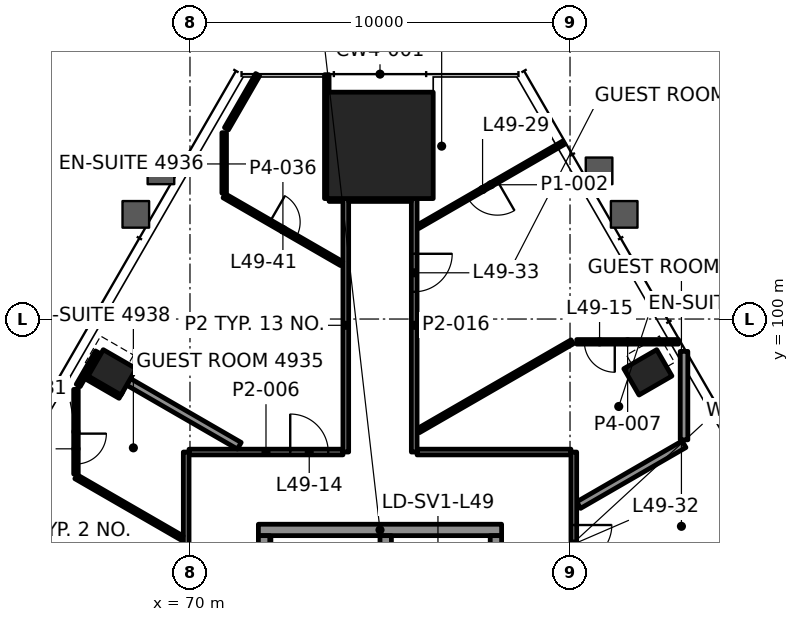
"""IFC4 building model, lengths in metres.
Left out: names, types, materials, properties, quantities, classifications, styles, units other than length and angle.
Written with IfcOpenShell. Run it as: python <this file> out.ifc"""

import sys

from ifc_helpers import new_model, si_unit, direction, frame, frame_2d, origin, origin_2d, place, context, subcontext, project, spatial, rectangle, hollow_rectangle, extrude, element, fill, save


model = new_model("IFC4")
c1 = context("Model", 3, precision=1e-05, world=origin(), true_north=direction((0.0, 1.0)))
c2 = subcontext(c1, "Body", "Model", "MODEL_VIEW")
j1 = project(units=[si_unit("LENGTHUNIT", "METRE"), si_unit("PLANEANGLEUNIT", "RADIAN")], contexts=[c1])
p1 = place(None, origin())
s1 = spatial("IfcSite", under=j1, at=p1, CompositionType="ELEMENT")
p2 = place(p1, origin())
s2 = spatial("IfcBuilding", under=s1, at=p2, CompositionType="ELEMENT")
p3 = place(p2, frame((0.0, 0.0, 210.4)))
s3 = spatial("IfcBuildingStorey", under=s2, at=p3, CompositionType="ELEMENT", Elevation=210.4)
p4 = place(p3, frame((75.0, 104.57, 0.0), z_axis=(0.0, 0.0, 1.0), x_axis=(-1.0, 0.0, 0.0)))
e1 = element("IfcColumn", 1, at=p4, inside=s3, PredefinedType="COLUMN", context=c2, shape_type="SweptSolid", body=[
    extrude(rectangle(XDim=2.8, YDim=2.8, at=origin_2d()), origin(), (0.0, 0.0, 1.0), 3.9),
])
for number, where, z_axis, x_axis in (
    (2, (82.048, 98.597, -0.0), (0.0, 0.0, 1.0), (-0.5, 0.866, 0.0)),
    (3, (67.952, 98.597, -0.0), (0.0, 0.0, 1.0), (-0.5, -0.866, 0.0)),
):
    element("IfcColumn", number, at=place(p3, frame(where, z_axis=z_axis, x_axis=x_axis)), inside=s3, PredefinedType="COLUMN", context=c2, shape_type="SweptSolid", body=[
        extrude(hollow_rectangle(XDim=0.8, YDim=1.0, WallThickness=0.05, at=origin_2d()), origin(), (0.0, 0.0, 1.0), 3.9),
    ])
p5 = place(p3, frame((71.8, 94.45, 0.0), z_axis=(0.0, 0.0, 1.0), x_axis=(1.0, 0.0, 0.0)))
e4 = element("IfcWall", 4, at=p5, inside=s3, PredefinedType="SHEAR", context=c2, shape_type="SweptSolid", body=[
    extrude(rectangle(XDim=6.4, YDim=0.3, at=frame_2d((3.2, 0.0))), origin(), (0.0, 0.0, 1.0), 3.7),
])
for number, where, z_axis, x_axis in (
    (5, (71.95, 88.1, 0.0), (0.0, 0.0, 1.0), (0.0, 1.0, 0.0)),
    (6, (78.05, 88.1, 0.0), (0.0, 0.0, 1.0), (0.0, 1.0, 0.0)),
):
    element("IfcWall", number, at=place(p3, frame(where, z_axis=z_axis, x_axis=x_axis)), inside=s3, PredefinedType="SHEAR", context=c2, shape_type="SweptSolid", body=[
        extrude(rectangle(XDim=6.2, YDim=0.3, at=frame_2d((3.1, 0.0))), origin(), (0.0, 0.0, 1.0), 3.7),
    ])
p6 = place(p3, frame((75.15, 88.1, 0.0), z_axis=(0.0, 0.0, 1.0), x_axis=(0.0, 1.0, 0.0)))
e7 = element("IfcWall", 7, at=p6, inside=s3, PredefinedType="SHEAR", context=c2, shape_type="SweptSolid", body=[
    extrude(rectangle(XDim=6.2, YDim=0.3, at=frame_2d((3.1, 0.0))), origin(), (0.0, 0.0, 1.0), 3.7),
])
p7 = place(p6, frame((0.185, 0.0, 0.0)))
e8 = element("IfcOpeningElement", 8, at=p7, cuts=e7, PredefinedType="OPENING", context=c2, shape_type="SweptSolid", body=[
    extrude(rectangle(XDim=1.0, YDim=2.1, at=frame_2d((0.5, 1.05))), frame((0.0, 0.16, 0.0), z_axis=(0.0, -1.0, 0.0), x_axis=(1.0, 0.0, 0.0)), (0.0, 0.0, 1.0), 0.32),
])
p8 = place(p3, frame((69.975, 96.5, 0.0), z_axis=(0.0, 0.0, 1.0), x_axis=(1.0, 0.0, 0.0)))
e9 = element("IfcWall", 9, at=p8, inside=s3, PredefinedType="PARTITIONING", context=c2, shape_type="SweptSolid", body=[
    extrude(rectangle(XDim=4.05, YDim=0.15, at=frame_2d((2.025, 0.0))), origin(), (0.0, 0.0, 1.0), 3.1),
])
p9 = place(p8, frame((2.663, 0.0, 0.0)))
e10 = element("IfcOpeningElement", 10, at=p9, cuts=e9, PredefinedType="OPENING", context=c2, shape_type="SweptSolid", body=[
    extrude(rectangle(XDim=1.0, YDim=2.1, at=frame_2d((0.5, 1.05))), frame((0.0, 0.085, 0.0), z_axis=(0.0, -1.0, 0.0), x_axis=(1.0, 0.0, 0.0)), (0.0, 0.0, 1.0), 0.17),
])
p10 = place(p3, frame((75.975, 96.5, 0.0), z_axis=(0.0, 0.0, 1.0), x_axis=(1.0, 0.0, 0.0)))
e11 = element("IfcWall", 11, at=p10, inside=s3, PredefinedType="PARTITIONING", context=c2, shape_type="SweptSolid", body=[
    extrude(rectangle(XDim=4.049, YDim=0.15, at=frame_2d((2.025, 0.0))), origin(), (0.0, 0.0, 1.0), 3.1),
])
p11 = place(p3, frame((82.855, 99.4, 0.0), z_axis=(0.0, 0.0, 1.0), x_axis=(-1.0, 0.0, 0.0)))
e12 = element("IfcWall", 12, at=p11, inside=s3, PredefinedType="PARTITIONING", context=c2, shape_type="SweptSolid", body=[
    extrude(rectangle(XDim=2.678, YDim=0.12, at=frame_2d((1.339, 0.0))), origin(), (0.0, 0.0, 1.0), 3.1),
])
p12 = place(p11, frame((1.677, 0.0, 0.0)))
e13 = element("IfcOpeningElement", 13, at=p12, cuts=e12, PredefinedType="OPENING", context=c2, shape_type="SweptSolid", body=[
    extrude(rectangle(XDim=0.8, YDim=2.1, at=frame_2d((0.4, 1.05))), frame((0.0, 0.07, 0.0), z_axis=(0.0, -1.0, 0.0), x_axis=(1.0, 0.0, 0.0)), (0.0, 0.0, 1.0), 0.14),
])
p13 = place(p3, frame((73.66, 103.17, 0.0), z_axis=(0.0, 0.0, 1.0), x_axis=(1.0, 0.0, 0.0)))
e14 = element("IfcWall", 14, at=p13, inside=s3, PredefinedType="PARTITIONING", context=c2, shape_type="SweptSolid", body=[
    extrude(rectangle(XDim=0.365, YDim=0.15, at=frame_2d((0.182, 0.0))), origin(), (0.0, 0.0, 1.0), 3.1),
])
p14 = place(p3, frame((80.227, 95.104, 0.0), z_axis=(0.0, 0.0, 1.0), x_axis=(0.866029421769, 0.499993040581, 0.0)))
e15 = element("IfcWall", 15, at=p14, inside=s3, PredefinedType="PARTITIONING", context=c2, shape_type="SweptSolid", body=[
    extrude(rectangle(XDim=3.202, YDim=0.2, at=frame_2d((1.601, 0.0))), origin(), (0.0, 0.0, 1.0), 3.022),
])
p15 = place(p3, frame((76.01, 97.063, 0.0), z_axis=(0.0, 0.0, 1.0), x_axis=(0.866045536992, 0.499965126639, 0.0)))
e16 = element("IfcWall", 16, at=p15, inside=s3, PredefinedType="PARTITIONING", context=c2, shape_type="SweptSolid", body=[
    extrude(rectangle(XDim=4.674, YDim=0.12, at=frame_2d((2.337, 0.0))), origin(), (0.0, 0.0, 1.0), 3.1),
])
p16 = place(p3, frame((79.83, 104.639, 0.0), z_axis=(0.0, 0.0, 1.0), x_axis=(-0.866005358171, -0.500034718414, 0.0)))
e17 = element("IfcWall", 17, at=p16, inside=s3, PredefinedType="PARTITIONING", context=c2, shape_type="SweptSolid", body=[
    extrude(rectangle(XDim=4.422, YDim=0.1, at=frame_2d((2.211, 0.0))), origin(), (0.0, 0.0, 1.0), 3.1),
])
p17 = place(p16, frame((2.011, 0.0, 0.0)))
e18 = element("IfcOpeningElement", 18, at=p17, cuts=e17, PredefinedType="OPENING", context=c2, shape_type="SweptSolid", body=[
    extrude(rectangle(XDim=0.9, YDim=2.1, at=frame_2d((0.45, 1.05))), frame((0.0, 0.06, 0.0), z_axis=(0.0, -1.0, 0.0), x_axis=(1.0, 0.0, 0.0)), (0.0, 0.0, 1.0), 0.12),
])
p18 = place(p3, frame((67.06, 98.253, 0.0), z_axis=(0.0, 0.0, 1.0), x_axis=(0.499972622635, 0.866041209536, 0.0)))
e19 = element("IfcWall", 19, at=p18, inside=s3, PredefinedType="PARTITIONING", context=c2, shape_type="SweptSolid", body=[
    extrude(rectangle(XDim=1.014, YDim=0.12, at=frame_2d((0.507, 0.0))), origin(), (0.0, 0.0, 1.0), 3.1),
])
p19 = place(p3, frame((70.96, 105.008, 0.0), z_axis=(0.0, 0.0, 1.0), x_axis=(0.500057100911, 0.865992434048, 0.0)))
e20 = element("IfcWall", 20, at=p19, inside=s3, PredefinedType="PARTITIONING", context=c2, shape_type="SweptSolid", body=[
    extrude(rectangle(XDim=1.642, YDim=0.12, at=frame_2d((0.821, 0.0))), origin(), (0.0, 0.0, 1.0), 3.1),
])
p20 = place(p3, frame((83.0, 96.821, 0.0), z_axis=(0.0, 0.0, 1.0), x_axis=(0.0, 1.0, 0.0)))
e21 = element("IfcWall", 21, at=p20, inside=s3, PredefinedType="PARTITIONING", context=c2, shape_type="SweptSolid", body=[
    extrude(rectangle(XDim=2.328, YDim=0.2, at=frame_2d((1.164, 0.0))), origin(), (0.0, 0.0, 1.0), 3.022),
])
p21 = place(p3, frame((80.1, 96.5, 0.0), z_axis=(0.0, 0.0, 1.0), x_axis=(0.0, -1.0, 0.0)))
e22 = element("IfcWall", 22, at=p21, inside=s3, PredefinedType="PARTITIONING", context=c2, shape_type="SweptSolid", body=[
    extrude(rectangle(XDim=10.6, YDim=0.15, at=frame_2d((5.3, 0.0))), origin(), (0.0, 0.0, 1.0), 3.097),
])
p22 = place(p21, frame((1.92, 0.0, 0.0)))
e23 = element("IfcOpeningElement", 23, at=p22, cuts=e22, PredefinedType="OPENING", context=c2, shape_type="SweptSolid", body=[
    extrude(rectangle(XDim=1.0, YDim=2.1, at=frame_2d((0.5, 1.05))), frame((0.0, 0.085, 0.0), z_axis=(0.0, -1.0, 0.0), x_axis=(1.0, 0.0, 0.0)), (0.0, 0.0, 1.0), 0.17),
])
p23 = place(p3, frame((75.9, 103.169, 0.0), z_axis=(0.0, 0.0, 1.0), x_axis=(0.0, -1.0, 0.0)))
e24 = element("IfcWall", 24, at=p23, inside=s3, PredefinedType="PARTITIONING", context=c2, shape_type="SweptSolid", body=[
    extrude(rectangle(XDim=6.669, YDim=0.15, at=frame_2d((3.334, 0.0))), origin(), (0.0, 0.0, 1.0), 3.1),
])
p24 = place(p23, frame((1.452, 0.0, 0.0)))
e25 = element("IfcOpeningElement", 25, at=p24, cuts=e24, PredefinedType="OPENING", context=c2, shape_type="SweptSolid", body=[
    extrude(rectangle(XDim=1.0, YDim=2.1, at=frame_2d((0.5, 1.05))), frame((0.0, 0.085, 0.0), z_axis=(0.0, -1.0, 0.0), x_axis=(1.0, 0.0, 0.0)), (0.0, 0.0, 1.0), 0.17),
])
p25 = place(p3, frame((74.1, 96.5, 0.0), z_axis=(0.0, 0.0, 1.0), x_axis=(0.0, 1.0, 0.0)))
e26 = element("IfcWall", 26, at=p25, inside=s3, PredefinedType="PARTITIONING", context=c2, shape_type="SweptSolid", body=[
    extrude(rectangle(XDim=6.67, YDim=0.15, at=frame_2d((3.335, 0.0))), origin(), (0.0, 0.0, 1.0), 3.1),
])
p26 = place(p3, frame((73.6, 103.17, 0.0), z_axis=(0.0, 0.0, 1.0), x_axis=(0.0, 1.0, 0.0)))
e27 = element("IfcWall", 27, at=p26, inside=s3, PredefinedType="PARTITIONING", context=c2, shape_type="SweptSolid", body=[
    extrude(rectangle(XDim=3.26, YDim=0.12, at=frame_2d((1.63, 0.0))), origin(), (0.0, 0.0, 1.0), 3.1),
])
p27 = place(p3, frame((70.9, 103.312, 0.0), z_axis=(0.0, 0.0, 1.0), x_axis=(0.0, 1.0, 0.0)))
e28 = element("IfcWall", 28, at=p27, inside=s3, PredefinedType="PARTITIONING", context=c2, shape_type="SweptSolid", body=[
    extrude(rectangle(XDim=1.592, YDim=0.12, at=frame_2d((0.796, 0.0))), origin(), (0.0, 0.0, 1.0), 3.1),
])
p28 = place(p3, frame((69.9, 85.9, 0.0), z_axis=(0.0, 0.0, 1.0), x_axis=(0.0, 1.0, 0.0)))
e29 = element("IfcWall", 29, at=p28, inside=s3, PredefinedType="PARTITIONING", context=c2, shape_type="SweptSolid", body=[
    extrude(rectangle(XDim=10.6, YDim=0.15, at=frame_2d((5.3, 0.0))), origin(), (0.0, 0.0, 1.0), 3.097),
])
p29 = place(p28, frame((1.968, 0.0, 0.0)))
e30 = element("IfcOpeningElement", 30, at=p29, cuts=e29, PredefinedType="OPENING", context=c2, shape_type="SweptSolid", body=[
    extrude(rectangle(XDim=0.9, YDim=2.1, at=frame_2d((0.45, 1.05))), frame((0.0, 0.085, 0.0), z_axis=(0.0, -1.0, 0.0), x_axis=(1.0, 0.0, 0.0)), (0.0, 0.0, 1.0), 0.17),
])
p30 = place(p28, frame((6.825, 0.0, 0.0)))
e31 = element("IfcOpeningElement", 31, at=p30, cuts=e29, PredefinedType="OPENING", context=c2, shape_type="SweptSolid", body=[
    extrude(rectangle(XDim=1.0, YDim=2.1, at=frame_2d((0.5, 1.05))), frame((0.0, 0.085, 0.0), z_axis=(0.0, -1.0, 0.0), x_axis=(1.0, 0.0, 0.0)), (0.0, 0.0, 1.0), 0.17),
])
p31 = place(p3, frame((67.0, 98.149, 0.0), z_axis=(0.0, 0.0, 1.0), x_axis=(0.0, -1.0, 0.0)))
e32 = element("IfcWall", 32, at=p31, inside=s3, PredefinedType="PARTITIONING", context=c2, shape_type="SweptSolid", body=[
    extrude(rectangle(XDim=2.228, YDim=0.12, at=frame_2d((1.114, 0.0))), origin(), (0.0, 0.0, 1.0), 3.022),
])
p32 = place(p31, frame((1.164, 0.0, 0.0)))
e33 = element("IfcOpeningElement", 33, at=p32, cuts=e32, PredefinedType="OPENING", context=c2, shape_type="SweptSolid", body=[
    extrude(rectangle(XDim=0.8, YDim=2.1, at=frame_2d((0.4, 1.05))), frame((0.0, 0.07, 0.0), z_axis=(0.0, -1.0, 0.0), x_axis=(1.0, 0.0, 0.0)), (0.0, 0.0, 1.0), 0.14),
])
p33 = place(p3, frame((70.9, 103.243, 0.0), z_axis=(0.0, 0.0, 1.0), x_axis=(0.866028357664, -0.499994883695, 0.0)))
e34 = element("IfcWall", 34, at=p33, inside=s3, PredefinedType="PARTITIONING", context=c2, shape_type="SweptSolid", body=[
    extrude(rectangle(XDim=3.568, YDim=0.12, at=frame_2d((1.784, 0.0))), origin(), (0.0, 0.0, 1.0), 3.1),
])
p34 = place(p33, frame((1.384, 0.0, 0.0)))
e35 = element("IfcOpeningElement", 35, at=p34, cuts=e34, PredefinedType="OPENING", context=c2, shape_type="SweptSolid", body=[
    extrude(rectangle(XDim=0.8, YDim=2.1, at=frame_2d((0.4, 1.05))), frame((0.0, 0.07, 0.0), z_axis=(0.0, -1.0, 0.0), x_axis=(1.0, 0.0, 0.0)), (0.0, 0.0, 1.0), 0.14),
])
p35 = place(p3, frame((71.298, 96.665, 0.0), z_axis=(0.0, 0.0, 1.0), x_axis=(-0.866023625329, 0.500003080363, 0.0)))
e36 = element("IfcWall", 36, at=p35, inside=s3, PredefinedType="PARTITIONING", context=c2, shape_type="SweptSolid", body=[
    extrude(rectangle(XDim=3.364, YDim=0.2, at=frame_2d((1.682, 0.0))), origin(), (0.0, 0.0, 1.0), 3.1),
])
p36 = place(p3, frame((68.185, 98.0, 0.0), z_axis=(0.0, 0.0, 1.0), x_axis=(-0.866071776036, 0.499919672301, 0.0)))
e37 = element("IfcWall", 37, at=p36, inside=s3, PredefinedType="PARTITIONING", context=c2, shape_type="SweptSolid", body=[
    extrude(rectangle(XDim=1.0, YDim=0.2, at=frame_2d((0.5, 0.0))), origin(), (0.0, 0.0, 1.0), 3.022),
])
p37 = place(p3, frame((69.79, 94.24, 0.0), z_axis=(0.0, 0.0, 1.0), x_axis=(-0.86604299788, 0.499969524894, 0.0)))
e38 = element("IfcWall", 38, at=p37, inside=s3, PredefinedType="PARTITIONING", context=c2, shape_type="SweptSolid", body=[
    extrude(rectangle(XDim=3.222, YDim=0.12, at=frame_2d((1.611, 0.0))), origin(), (0.0, 0.0, 1.0), 3.1),
])
p38 = place(p3, frame((74.175, 103.17, 0.0), z_axis=(0.0, 0.0, 1.0), x_axis=(1.0, 0.0, 0.0)))
e39 = element("IfcWall", 39, at=p38, inside=s3, PredefinedType="PARTITIONING", context=c2, shape_type="SweptSolid", body=[
    extrude(rectangle(XDim=1.649, YDim=0.15, at=frame_2d((0.825, 0.0))), origin(), (0.0, 0.0, 1.0), 3.097),
])
p39 = place(p9, origin())
e40 = element("IfcDoor", 40, at=p39, inside=s3, OperationType="SINGLE_SWING_RIGHT", PredefinedType="DOOR", context=c2, shape_type="SweptSolid", body=[
    extrude(rectangle(XDim=1.0, YDim=2.1, at=frame_2d((0.5, 1.05))), frame((0.0, 0.025, 0.0), z_axis=(0.0, -1.0, 0.0), x_axis=(1.0, 0.0, 0.0)), (0.0, 0.0, 1.0), 0.05),
])
fill(e10, e40)
p40 = place(p12, origin())
e41 = element("IfcDoor", 41, at=p40, inside=s3, OperationType="SINGLE_SWING_LEFT", PredefinedType="DOOR", context=c2, shape_type="SweptSolid", body=[
    extrude(rectangle(XDim=0.8, YDim=2.1, at=frame_2d((0.4, 1.05))), frame((0.0, 0.025, 0.0), z_axis=(0.0, -1.0, 0.0), x_axis=(1.0, 0.0, 0.0)), (0.0, 0.0, 1.0), 0.05),
])
fill(e13, e41)
p41 = place(p17, origin())
e42 = element("IfcDoor", 42, at=p41, inside=s3, OperationType="SINGLE_SWING_RIGHT", PredefinedType="DOOR", context=c2, shape_type="SweptSolid", body=[
    extrude(rectangle(XDim=0.9, YDim=2.1, at=frame_2d((0.45, 1.05))), frame((0.0, 0.025, 0.0), z_axis=(0.0, -1.0, 0.0), x_axis=(1.0, 0.0, 0.0)), (0.0, 0.0, 1.0), 0.05),
])
fill(e18, e42)
p42 = place(p22, origin())
e43 = element("IfcDoor", 43, at=p42, inside=s3, OperationType="SINGLE_SWING_RIGHT", PredefinedType="DOOR", context=c2, shape_type="SweptSolid", body=[
    extrude(rectangle(XDim=1.0, YDim=2.1, at=frame_2d((0.5, 1.05))), frame((0.0, 0.025, 0.0), z_axis=(0.0, -1.0, 0.0), x_axis=(1.0, 0.0, 0.0)), (0.0, 0.0, 1.0), 0.05),
])
fill(e23, e43)
p43 = place(p24, origin())
e44 = element("IfcDoor", 44, at=p43, inside=s3, OperationType="SINGLE_SWING_RIGHT", PredefinedType="DOOR", context=c2, shape_type="SweptSolid", body=[
    extrude(rectangle(XDim=1.0, YDim=2.1, at=frame_2d((0.5, 1.05))), frame((0.0, 0.025, 0.0), z_axis=(0.0, -1.0, 0.0), x_axis=(1.0, 0.0, 0.0)), (0.0, 0.0, 1.0), 0.05),
])
fill(e25, e44)
p44 = place(p32, origin())
e45 = element("IfcDoor", 45, at=p44, inside=s3, OperationType="SINGLE_SWING_RIGHT", PredefinedType="DOOR", context=c2, shape_type="SweptSolid", body=[
    extrude(rectangle(XDim=0.8, YDim=2.1, at=frame_2d((0.4, 1.05))), frame((0.0, 0.025, 0.0), z_axis=(0.0, -1.0, 0.0), x_axis=(1.0, 0.0, 0.0)), (0.0, 0.0, 1.0), 0.05),
])
fill(e33, e45)
p45 = place(p34, origin())
e46 = element("IfcDoor", 46, at=p45, inside=s3, OperationType="SINGLE_SWING_RIGHT", PredefinedType="DOOR", context=c2, shape_type="SweptSolid", body=[
    extrude(rectangle(XDim=0.8, YDim=2.1, at=frame_2d((0.4, 1.05))), frame((0.0, 0.025, 0.0), z_axis=(0.0, -1.0, 0.0), x_axis=(1.0, 0.0, 0.0)), (0.0, 0.0, 1.0), 0.05),
])
fill(e35, e46)
save(model, sys.argv[1])
